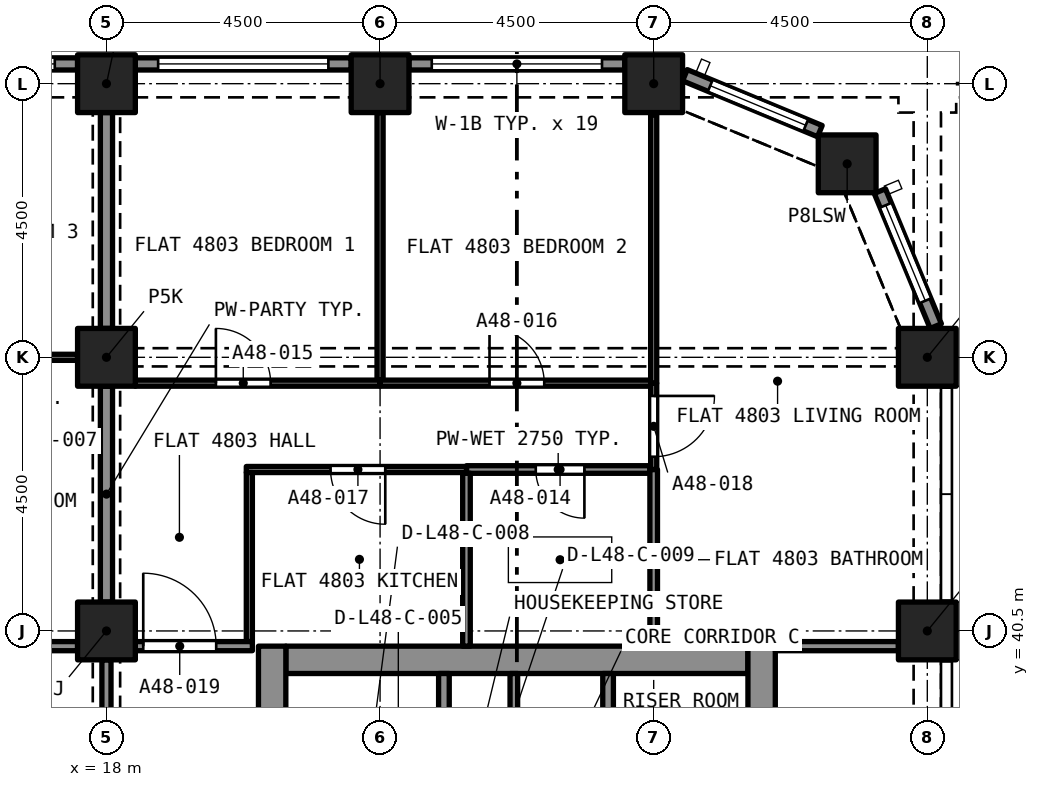
"""IFC4 building model, lengths in metres.
Left out: names, types, materials, properties, quantities, classifications, styles, units other than length and angle.
Written with IfcOpenShell. Run it as: python <this file> out.ifc"""

import sys

from ifc_helpers import new_model, si_unit, direction, frame, frame_2d, origin, origin_2d, place, context, subcontext, project, spatial, rectangle, extrude, element, fill, save


model = new_model("IFC4")
c1 = context("Model", 3, precision=1e-05, world=origin(), true_north=direction((0.0, 1.0)))
c2 = subcontext(c1, "Body", "Model", "MODEL_VIEW")
j1 = project(units=[si_unit("LENGTHUNIT", "METRE"), si_unit("PLANEANGLEUNIT", "RADIAN")], contexts=[c1])
p1 = place(None, origin())
s1 = spatial("IfcSite", under=j1, at=p1, CompositionType="ELEMENT")
p2 = place(p1, origin())
s2 = spatial("IfcBuilding", under=s1, at=p2, CompositionType="ELEMENT")
p3 = place(p2, frame((0.0, 0.0, 176.3)))
s3 = spatial("IfcBuildingStorey", under=s2, at=p3, CompositionType="ELEMENT", Elevation=176.3)
for number, where, z_axis, x_axis in (
    (1, (18.0, 40.5, 0.0), (0.0, 0.0, 1.0), (1.0, 0.0, 0.0)),
    (2, (31.5, 40.5, 0.0), (0.0, 0.0, 1.0), (1.0, 0.0, 0.0)),
    (3, (18.0, 45.0, 0.0), (0.0, 0.0, 1.0), (1.0, 0.0, 0.0)),
    (4, (31.5, 45.0, 0.0), (0.0, 0.0, 1.0), (1.0, 0.0, 0.0)),
    (5, (30.182, 48.182, 0.0), (0.0, 0.0, 1.0), (1.0, 0.0, 0.0)),
    (6, (18.0, 49.5, 0.0), (0.0, 0.0, 1.0), (1.0, 0.0, 0.0)),
):
    element("IfcColumn", number, at=place(p3, frame(where, z_axis=z_axis, x_axis=x_axis)), inside=s3, PredefinedType="COLUMN", context=c2, shape_type="SweptSolid", body=[
        extrude(rectangle(XDim=0.95, YDim=0.95, at=origin_2d()), origin(), (0.0, 0.0, 1.0), 3.2),
    ])
for number, where, z_axis, x_axis in (
    (7, (22.5, 49.5, -0.45), (0.0, 0.0, 1.0), (1.0, 0.0, 0.0)),
    (8, (27.0, 49.5, -0.45), (0.0, 0.0, 1.0), (1.0, 0.0, 0.0)),
):
    element("IfcColumn", number, at=place(p3, frame(where, z_axis=z_axis, x_axis=x_axis)), inside=s3, PredefinedType="COLUMN", context=c2, shape_type="SweptSolid", body=[
        extrude(rectangle(XDim=0.95, YDim=0.95, at=origin_2d()), origin(), (0.0, 0.0, 1.0), 3.65),
    ])
p4 = place(p3, frame((20.95, 40.025, 0.0), z_axis=(0.0, 0.0, 1.0), x_axis=(1.0, 0.0, 0.0)))
e9 = element("IfcWall", 9, at=p4, inside=s3, PredefinedType="SOLIDWALL", context=c2, shape_type="SweptSolid", body=[
    extrude(rectangle(XDim=7.6, YDim=0.45, at=frame_2d((3.8, 0.0))), origin(), (0.0, 0.0, 1.0), 3.2),
])
p5 = place(p3, frame((20.725, 27.25, 0.0), z_axis=(0.0, 0.0, 1.0), x_axis=(0.0, 1.0, 0.0)))
e10 = element("IfcWall", 10, at=p5, inside=s3, PredefinedType="SOLIDWALL", context=c2, shape_type="SweptSolid", body=[
    extrude(rectangle(XDim=13.0, YDim=0.45, at=frame_2d((6.5, 0.0))), origin(), (0.0, 0.0, 1.0), 3.2),
])
p6 = place(p5, frame((8.7, 0.0, 0.0)))
e11 = element("IfcOpeningElement", 11, at=p6, cuts=e10, PredefinedType="OPENING", context=c2, shape_type="SweptSolid", body=[
    extrude(rectangle(XDim=1.2, YDim=2.1, at=frame_2d((0.6, 1.05))), frame((0.0, 0.235, 0.0), z_axis=(0.0, -1.0, 0.0), x_axis=(1.0, 0.0, 0.0)), (0.0, 0.0, 1.0), 0.47),
])
p7 = place(p3, frame((28.775, 27.25, 0.0), z_axis=(0.0, 0.0, 1.0), x_axis=(0.0, 1.0, 0.0)))
e12 = element("IfcWall", 12, at=p7, inside=s3, PredefinedType="SOLIDWALL", context=c2, shape_type="SweptSolid", body=[
    extrude(rectangle(XDim=13.0, YDim=0.45, at=frame_2d((6.5, 0.0))), origin(), (0.0, 0.0, 1.0), 3.2),
])
p8 = place(p7, frame((8.7, 0.0, 0.0)))
e13 = element("IfcOpeningElement", 13, at=p8, cuts=e12, PredefinedType="OPENING", context=c2, shape_type="SweptSolid", body=[
    extrude(rectangle(XDim=1.2, YDim=2.1, at=frame_2d((0.6, 1.05))), frame((0.0, 0.235, 0.0), z_axis=(0.0, -1.0, 0.0), x_axis=(1.0, 0.0, 0.0)), (0.0, 0.0, 1.0), 0.47),
])
p9 = place(p3, frame((30.72, 47.733, 0.0), z_axis=(0.0, 0.0, 1.0), x_axis=(0.382680855588, -0.923880599843, 0.0)))
e14 = element("IfcWall", 14, at=p9, inside=s3, PredefinedType="SOLIDWALL", context=c2, shape_type="SweptSolid", body=[
    extrude(rectangle(XDim=2.403, YDim=0.2, at=frame_2d((1.201, 0.0))), origin(), (0.0, 0.0, 1.0), 3.2),
])
p10 = place(p9, frame((0.251, 0.0, 0.45)))
e15 = element("IfcOpeningElement", 15, at=p10, cuts=e14, PredefinedType="OPENING", context=c2, shape_type="SweptSolid", body=[
    extrude(rectangle(XDim=1.7, YDim=1.95, at=frame_2d((0.85, 0.975))), frame((0.0, 0.11, 0.0), z_axis=(0.0, -1.0, 0.0), x_axis=(1.0, 0.0, 0.0)), (0.0, 0.0, 1.0), 0.22),
])
p11 = place(p3, frame((27.513, 49.639, 0.0), z_axis=(0.0, 0.0, 1.0), x_axis=(0.923880599843, -0.382680855588, 0.0)))
e16 = element("IfcWall", 16, at=p11, inside=s3, PredefinedType="SOLIDWALL", context=c2, shape_type="SweptSolid", body=[
    extrude(rectangle(XDim=2.403, YDim=0.2, at=frame_2d((1.201, 0.0))), origin(), (0.0, 0.0, 1.0), 3.2),
])
p12 = place(p11, frame((0.451, 0.0, 0.45)))
e17 = element("IfcOpeningElement", 17, at=p12, cuts=e16, PredefinedType="OPENING", context=c2, shape_type="SweptSolid", body=[
    extrude(rectangle(XDim=1.7, YDim=1.95, at=frame_2d((0.85, 0.975))), frame((0.0, 0.11, 0.0), z_axis=(0.0, -1.0, 0.0), x_axis=(1.0, 0.0, 0.0)), (0.0, 0.0, 1.0), 0.22),
])
p13 = place(p3, frame((22.975, 49.825, 0.0), z_axis=(0.0, 0.0, 1.0), x_axis=(1.0, 0.0, 0.0)))
e18 = element("IfcWall", 18, at=p13, inside=s3, PredefinedType="SOLIDWALL", context=c2, shape_type="SweptSolid", body=[
    extrude(rectangle(XDim=3.55, YDim=0.2, at=frame_2d((1.775, 0.0))), origin(), (0.0, 0.0, 1.0), 3.2),
])
p14 = place(p13, frame((0.375, 0.0, 0.45)))
e19 = element("IfcOpeningElement", 19, at=p14, cuts=e18, PredefinedType="OPENING", context=c2, shape_type="SweptSolid", body=[
    extrude(rectangle(XDim=2.8, YDim=1.95, at=frame_2d((1.4, 0.975))), frame((0.0, 0.11, 0.0), z_axis=(0.0, -1.0, 0.0), x_axis=(1.0, 0.0, 0.0)), (0.0, 0.0, 1.0), 0.22),
])
p15 = place(p3, frame((18.475, 49.825, 0.0), z_axis=(0.0, 0.0, 1.0), x_axis=(1.0, 0.0, 0.0)))
e20 = element("IfcWall", 20, at=p15, inside=s3, PredefinedType="SOLIDWALL", context=c2, shape_type="SweptSolid", body=[
    extrude(rectangle(XDim=3.55, YDim=0.2, at=frame_2d((1.775, 0.0))), origin(), (0.0, 0.0, 1.0), 3.2),
])
p16 = place(p15, frame((0.375, 0.0, 0.45)))
e21 = element("IfcOpeningElement", 21, at=p16, cuts=e20, PredefinedType="OPENING", context=c2, shape_type="SweptSolid", body=[
    extrude(rectangle(XDim=2.8, YDim=1.95, at=frame_2d((1.4, 0.975))), frame((0.0, 0.11, 0.0), z_axis=(0.0, -1.0, 0.0), x_axis=(1.0, 0.0, 0.0)), (0.0, 0.0, 1.0), 0.22),
])
p17 = place(p3, frame((13.975, 49.825, 0.0), z_axis=(0.0, 0.0, 1.0), x_axis=(1.0, 0.0, 0.0)))
e22 = element("IfcWall", 22, at=p17, inside=s3, PredefinedType="SOLIDWALL", context=c2, shape_type="SweptSolid", body=[
    extrude(rectangle(XDim=3.55, YDim=0.2, at=frame_2d((1.775, 0.0))), origin(), (0.0, 0.0, 1.0), 3.2),
])
p18 = place(p17, frame((0.375, 0.0, 0.45)))
e23 = element("IfcOpeningElement", 23, at=p18, cuts=e22, PredefinedType="OPENING", context=c2, shape_type="SweptSolid", body=[
    extrude(rectangle(XDim=2.8, YDim=1.95, at=frame_2d((1.4, 0.975))), frame((0.0, 0.11, 0.0), z_axis=(0.0, -1.0, 0.0), x_axis=(1.0, 0.0, 0.0)), (0.0, 0.0, 1.0), 0.22),
])
p19 = place(p3, frame((17.9, 43.62, 0.0), z_axis=(0.0, 0.0, 1.0), x_axis=(-1.0, 0.0, 0.0)))
e24 = element("IfcWall", 24, at=p19, inside=s3, PredefinedType="PARTITIONING", context=c2, shape_type="SweptSolid", body=[
    extrude(rectangle(XDim=4.29, YDim=0.125, at=frame_2d((2.145, 0.0))), origin(), (0.0, 0.0, 1.0), 2.9),
])
p20 = place(p19, frame((1.695, 0.0, 0.0)))
e25 = element("IfcOpeningElement", 25, at=p20, cuts=e24, PredefinedType="OPENING", context=c2, shape_type="SweptSolid", body=[
    extrude(rectangle(XDim=0.8, YDim=2.1, at=frame_2d((0.4, 1.05))), frame((0.0, 0.073, 0.0), z_axis=(0.0, -1.0, 0.0), x_axis=(1.0, 0.0, 0.0)), (0.0, 0.0, 1.0), 0.145),
])
p21 = place(p3, frame((18.0, 40.975, 0.0), z_axis=(0.0, 0.0, 1.0), x_axis=(0.0, 1.0, 0.0)))
e26 = element("IfcWall", 26, at=p21, inside=s3, PredefinedType="PARTITIONING", context=c2, shape_type="SweptSolid", body=[
    extrude(rectangle(XDim=3.55, YDim=0.2, at=frame_2d((1.775, 0.0))), origin(), (0.0, 0.0, 1.0), 2.38),
])
p22 = place(p3, frame((13.5, 45.0, 0.0), z_axis=(0.0, 0.0, 1.0), x_axis=(1.0, 0.0, 0.0)))
e27 = element("IfcWall", 27, at=p22, inside=s3, PredefinedType="PARTITIONING", context=c2, shape_type="SweptSolid", body=[
    extrude(rectangle(XDim=4.025, YDim=0.1, at=frame_2d((2.012, 0.0))), origin(), (0.0, 0.0, 1.0), 2.9),
])
p23 = place(p22, frame((1.8, 0.0, 0.0)))
e28 = element("IfcOpeningElement", 28, at=p23, cuts=e27, PredefinedType="OPENING", context=c2, shape_type="SweptSolid", body=[
    extrude(rectangle(XDim=0.9, YDim=2.1, at=frame_2d((0.45, 1.05))), frame((0.0, 0.06, 0.0), z_axis=(0.0, -1.0, 0.0), x_axis=(1.0, 0.0, 0.0)), (0.0, 0.0, 1.0), 0.12),
])
p24 = place(p3, frame((18.0, 45.475, 0.0), z_axis=(0.0, 0.0, 1.0), x_axis=(0.0, 1.0, 0.0)))
e29 = element("IfcWall", 29, at=p24, inside=s3, PredefinedType="PARTITIONING", context=c2, shape_type="SweptSolid", body=[
    extrude(rectangle(XDim=3.55, YDim=0.2, at=frame_2d((1.775, 0.0))), origin(), (0.0, 0.0, 1.0), 2.38),
])
p25 = place(p3, frame((13.25, 40.25, 0.0), z_axis=(0.0, 0.0, 1.0), x_axis=(1.0, 0.0, 0.0)))
e30 = element("IfcWall", 30, at=p25, inside=s3, PredefinedType="PARTITIONING", context=c2, shape_type="SweptSolid", body=[
    extrude(rectangle(XDim=4.275, YDim=0.15, at=frame_2d((2.137, 0.0))), origin(), (0.0, 0.0, 1.0), 2.9),
])
p26 = place(p3, frame((26.938, 43.155, 0.0), z_axis=(0.0, 0.0, 1.0), x_axis=(-1.0, 0.0, 0.0)))
e31 = element("IfcWall", 31, at=p26, inside=s3, PredefinedType="PARTITIONING", context=c2, shape_type="SweptSolid", body=[
    extrude(rectangle(XDim=3.016, YDim=0.125, at=frame_2d((1.508, 0.0))), origin(), (0.0, 0.0, 1.0), 2.75),
])
p27 = place(p26, frame((1.077, 0.0, 0.0)))
e32 = element("IfcOpeningElement", 32, at=p27, cuts=e31, PredefinedType="OPENING", context=c2, shape_type="SweptSolid", body=[
    extrude(rectangle(XDim=0.8, YDim=2.1, at=frame_2d((0.4, 1.05))), frame((0.0, 0.073, 0.0), z_axis=(0.0, -1.0, 0.0), x_axis=(1.0, 0.0, 0.0)), (0.0, 0.0, 1.0), 0.145),
])
p28 = place(p3, frame((23.921, 40.25, 0.0), z_axis=(0.0, 0.0, 1.0), x_axis=(0.0, 1.0, 0.0)))
e33 = element("IfcWall", 33, at=p28, inside=s3, PredefinedType="PARTITIONING", context=c2, shape_type="SweptSolid", body=[
    extrude(rectangle(XDim=2.843, YDim=0.125, at=frame_2d((1.421, 0.0))), origin(), (0.0, 0.0, 1.0), 2.75),
])
p29 = place(p3, frame((27.0, 40.25, 0.0), z_axis=(0.0, 0.0, 1.0), x_axis=(0.0, 1.0, 0.0)))
e34 = element("IfcWall", 34, at=p29, inside=s3, PredefinedType="PARTITIONING", context=c2, shape_type="SweptSolid", body=[
    extrude(rectangle(XDim=2.905, YDim=0.125, at=frame_2d((1.453, 0.0))), origin(), (0.0, 0.0, 1.0), 2.75),
])
p30 = place(p3, frame((22.5, 44.625, 0.0), z_axis=(0.0, 0.0, 1.0), x_axis=(0.0, 1.0, 0.0)))
e35 = element("IfcWall", 35, at=p30, inside=s3, PredefinedType="PARTITIONING", context=c2, shape_type="SweptSolid", body=[
    extrude(rectangle(XDim=4.4, YDim=0.1, at=frame_2d((2.2, 0.0))), origin(), (0.0, 0.0, 1.0), 2.75),
])
p31 = place(p3, frame((18.475, 44.575, 0.0), z_axis=(0.0, 0.0, 1.0), x_axis=(1.0, 0.0, 0.0)))
e36 = element("IfcWall", 36, at=p31, inside=s3, PredefinedType="PARTITIONING", context=c2, shape_type="SweptSolid", body=[
    extrude(rectangle(XDim=4.025, YDim=0.1, at=frame_2d((2.012, 0.0))), origin(), (0.0, 0.0, 1.0), 2.75),
])
p32 = place(p31, frame((1.325, 0.0, 0.0)))
e37 = element("IfcOpeningElement", 37, at=p32, cuts=e36, PredefinedType="OPENING", context=c2, shape_type="SweptSolid", body=[
    extrude(rectangle(XDim=0.9, YDim=2.1, at=frame_2d((0.45, 1.05))), frame((0.0, 0.06, 0.0), z_axis=(0.0, -1.0, 0.0), x_axis=(1.0, 0.0, 0.0)), (0.0, 0.0, 1.0), 0.12),
])
p33 = place(p3, frame((22.5, 44.575, 0.0), z_axis=(0.0, 0.0, 1.0), x_axis=(1.0, 0.0, 0.0)))
e38 = element("IfcWall", 38, at=p33, inside=s3, PredefinedType="PARTITIONING", context=c2, shape_type="SweptSolid", body=[
    extrude(rectangle(XDim=4.45, YDim=0.1, at=frame_2d((2.225, 0.0))), origin(), (0.0, 0.0, 1.0), 2.75),
])
p34 = place(p33, frame((1.8, 0.0, 0.0)))
e39 = element("IfcOpeningElement", 39, at=p34, cuts=e38, PredefinedType="OPENING", context=c2, shape_type="SweptSolid", body=[
    extrude(rectangle(XDim=0.9, YDim=2.1, at=frame_2d((0.45, 1.05))), frame((0.0, 0.06, 0.0), z_axis=(0.0, -1.0, 0.0), x_axis=(1.0, 0.0, 0.0)), (0.0, 0.0, 1.0), 0.12),
])
p35 = place(p3, frame((27.0, 44.575, 0.0), z_axis=(0.0, 0.0, 1.0), x_axis=(0.0, 1.0, 0.0)))
e40 = element("IfcWall", 40, at=p35, inside=s3, PredefinedType="PARTITIONING", context=c2, shape_type="SweptSolid", body=[
    extrude(rectangle(XDim=4.411, YDim=0.1, at=frame_2d((2.206, 0.0))), origin(), (0.0, 0.0, 1.0), 2.75),
])
p36 = place(p3, frame((23.921, 43.155, 0.0), z_axis=(0.0, 0.0, 1.0), x_axis=(-1.0, 0.0, 0.0)))
e41 = element("IfcWall", 41, at=p36, inside=s3, PredefinedType="PARTITIONING", context=c2, shape_type="SweptSolid", body=[
    extrude(rectangle(XDim=3.621, YDim=0.1, at=frame_2d((1.811, 0.0))), origin(), (0.0, 0.0, 1.0), 2.75),
])
p37 = place(p36, frame((1.335, 0.0, 0.0)))
e42 = element("IfcOpeningElement", 42, at=p37, cuts=e41, PredefinedType="OPENING", context=c2, shape_type="SweptSolid", body=[
    extrude(rectangle(XDim=0.9, YDim=2.1, at=frame_2d((0.45, 1.05))), frame((0.0, 0.06, 0.0), z_axis=(0.0, -1.0, 0.0), x_axis=(1.0, 0.0, 0.0)), (0.0, 0.0, 1.0), 0.12),
])
p38 = place(p3, frame((20.35, 40.325, 0.0), z_axis=(0.0, 0.0, 1.0), x_axis=(0.0, 1.0, 0.0)))
e43 = element("IfcWall", 43, at=p38, inside=s3, PredefinedType="PARTITIONING", context=c2, shape_type="SweptSolid", body=[
    extrude(rectangle(XDim=2.78, YDim=0.1, at=frame_2d((1.39, 0.0))), origin(), (0.0, 0.0, 1.0), 2.75),
])
p39 = place(p3, frame((27.0, 44.575, 0.0), z_axis=(0.0, 0.0, 1.0), x_axis=(0.0, -1.0, 0.0)))
e44 = element("IfcWall", 44, at=p39, inside=s3, PredefinedType="PARTITIONING", context=c2, shape_type="SweptSolid", body=[
    extrude(rectangle(XDim=1.42, YDim=0.1, at=frame_2d((0.71, 0.0))), origin(), (0.0, 0.0, 1.0), 2.75),
])
p40 = place(p39, frame((0.21, 0.0, 0.0)))
e45 = element("IfcOpeningElement", 45, at=p40, cuts=e44, PredefinedType="OPENING", context=c2, shape_type="SweptSolid", body=[
    extrude(rectangle(XDim=1.0, YDim=2.1, at=frame_2d((0.5, 1.05))), frame((0.0, 0.06, 0.0), z_axis=(0.0, -1.0, 0.0), x_axis=(1.0, 0.0, 0.0)), (0.0, 0.0, 1.0), 0.12),
])
p41 = place(p3, frame((18.475, 40.25, 0.0), z_axis=(0.0, 0.0, 1.0), x_axis=(1.0, 0.0, 0.0)))
e46 = element("IfcWall", 46, at=p41, inside=s3, PredefinedType="PARTITIONING", context=c2, shape_type="SweptSolid", body=[
    extrude(rectangle(XDim=1.925, YDim=0.15, at=frame_2d((0.962, 0.0))), origin(), (0.0, 0.0, 1.0), 2.75),
])
p42 = place(p41, frame((0.13, 0.0, 0.0)))
e47 = element("IfcOpeningElement", 47, at=p42, cuts=e46, PredefinedType="OPENING", context=c2, shape_type="SweptSolid", body=[
    extrude(rectangle(XDim=1.2, YDim=2.4, at=frame_2d((0.6, 1.2))), frame((0.0, 0.085, 0.0), z_axis=(0.0, -1.0, 0.0), x_axis=(1.0, 0.0, 0.0)), (0.0, 0.0, 1.0), 0.17),
])
p43 = place(p3, frame((29.0, 40.25, 0.0), z_axis=(0.0, 0.0, 1.0), x_axis=(1.0, 0.0, 0.0)))
e48 = element("IfcWall", 48, at=p43, inside=s3, PredefinedType="PARTITIONING", context=c2, shape_type="SweptSolid", body=[
    extrude(rectangle(XDim=2.025, YDim=0.15, at=frame_2d((1.012, 0.0))), origin(), (0.0, 0.0, 1.0), 2.75),
])
p44 = place(p3, frame((18.0, 40.025, 0.0), z_axis=(0.0, 0.0, 1.0), x_axis=(0.0, -1.0, 0.0)))
e49 = element("IfcWall", 49, at=p44, inside=s3, PredefinedType="PARTITIONING", context=c2, shape_type="SweptSolid", body=[
    extrude(rectangle(XDim=3.55, YDim=0.15, at=frame_2d((1.775, 0.0))), origin(), (0.0, 0.0, 1.0), 2.38),
])
p45 = place(p44, frame((1.175, 0.0, 0.0)))
e50 = element("IfcOpeningElement", 50, at=p45, cuts=e49, PredefinedType="OPENING", context=c2, shape_type="SweptSolid", body=[
    extrude(rectangle(XDim=1.2, YDim=2.1, at=frame_2d((0.6, 1.05))), frame((0.0, 0.085, 0.0), z_axis=(0.0, -1.0, 0.0), x_axis=(1.0, 0.0, 0.0)), (0.0, 0.0, 1.0), 0.17),
])
for number, where, z_axis, x_axis in (
    (51, (23.55, 37.5, 0.0), (0.0, 0.0, 1.0), (0.0, 1.0, 0.0)),
    (52, (26.25, 37.5, 0.0), (0.0, 0.0, 1.0), (0.0, 1.0, 0.0)),
):
    element("IfcWall", number, at=place(p3, frame(where, z_axis=z_axis, x_axis=x_axis)), inside=s3, PredefinedType="SOLIDWALL", context=c2, shape_type="SweptSolid", body=[
        extrude(rectangle(XDim=2.3, YDim=0.175, at=frame_2d((1.15, 0.0))), origin(), (0.0, 0.0, 1.0), 2.9),
    ])
p46 = place(p3, frame((24.7, 37.5, 0.0), z_axis=(0.0, 0.0, 1.0), x_axis=(0.0, 1.0, 0.0)))
e53 = element("IfcWall", 53, at=p46, inside=s3, PredefinedType="PARTITIONING", context=c2, shape_type="SweptSolid", body=[
    extrude(rectangle(XDim=2.3, YDim=0.125, at=frame_2d((1.15, 0.0))), origin(), (0.0, 0.0, 1.0), 2.9),
])
p47 = place(p10, origin())
e54 = element("IfcWindow", 54, at=p47, inside=s3, PartitioningType="SINGLE_PANEL", PredefinedType="WINDOW", context=c2, shape_type="SweptSolid", body=[
    extrude(rectangle(XDim=1.7, YDim=1.95, at=frame_2d((0.85, 0.975))), frame((0.0, 0.03, 0.0), z_axis=(0.0, -1.0, 0.0), x_axis=(1.0, 0.0, 0.0)), (0.0, 0.0, 1.0), 0.06),
])
fill(e15, e54)
p48 = place(p12, origin())
e55 = element("IfcWindow", 55, at=p48, inside=s3, PartitioningType="SINGLE_PANEL", PredefinedType="WINDOW", context=c2, shape_type="SweptSolid", body=[
    extrude(rectangle(XDim=1.7, YDim=1.95, at=frame_2d((0.85, 0.975))), frame((0.0, 0.03, 0.0), z_axis=(0.0, -1.0, 0.0), x_axis=(1.0, 0.0, 0.0)), (0.0, 0.0, 1.0), 0.06),
])
fill(e17, e55)
p49 = place(p14, origin())
e56 = element("IfcWindow", 56, at=p49, inside=s3, PartitioningType="SINGLE_PANEL", PredefinedType="WINDOW", context=c2, shape_type="SweptSolid", body=[
    extrude(rectangle(XDim=2.8, YDim=1.95, at=frame_2d((1.4, 0.975))), frame((0.0, 0.03, 0.0), z_axis=(0.0, -1.0, 0.0), x_axis=(1.0, 0.0, 0.0)), (0.0, 0.0, 1.0), 0.06),
])
fill(e19, e56)
p50 = place(p16, origin())
e57 = element("IfcWindow", 57, at=p50, inside=s3, PartitioningType="SINGLE_PANEL", PredefinedType="WINDOW", context=c2, shape_type="SweptSolid", body=[
    extrude(rectangle(XDim=2.8, YDim=1.95, at=frame_2d((1.4, 0.975))), frame((0.0, 0.03, 0.0), z_axis=(0.0, -1.0, 0.0), x_axis=(1.0, 0.0, 0.0)), (0.0, 0.0, 1.0), 0.06),
])
fill(e21, e57)
p51 = place(p18, origin())
e58 = element("IfcWindow", 58, at=p51, inside=s3, PartitioningType="SINGLE_PANEL", PredefinedType="WINDOW", context=c2, shape_type="SweptSolid", body=[
    extrude(rectangle(XDim=2.8, YDim=1.95, at=frame_2d((1.4, 0.975))), frame((0.0, 0.03, 0.0), z_axis=(0.0, -1.0, 0.0), x_axis=(1.0, 0.0, 0.0)), (0.0, 0.0, 1.0), 0.06),
])
fill(e23, e58)
p52 = place(p27, origin())
e59 = element("IfcDoor", 59, at=p52, inside=s3, OperationType="SINGLE_SWING_LEFT", PredefinedType="DOOR", context=c2, shape_type="SweptSolid", body=[
    extrude(rectangle(XDim=0.8, YDim=2.1, at=frame_2d((0.4, 1.05))), frame((0.0, 0.025, 0.0), z_axis=(0.0, -1.0, 0.0), x_axis=(1.0, 0.0, 0.0)), (0.0, 0.0, 1.0), 0.05),
])
fill(e32, e59)
p53 = place(p32, origin())
e60 = element("IfcDoor", 60, at=p53, inside=s3, OperationType="SINGLE_SWING_LEFT", PredefinedType="DOOR", context=c2, shape_type="SweptSolid", body=[
    extrude(rectangle(XDim=0.9, YDim=2.1, at=frame_2d((0.45, 1.05))), frame((0.0, 0.025, 0.0), z_axis=(0.0, -1.0, 0.0), x_axis=(1.0, 0.0, 0.0)), (0.0, 0.0, 1.0), 0.05),
])
fill(e37, e60)
p54 = place(p34, origin())
e61 = element("IfcDoor", 61, at=p54, inside=s3, OperationType="SINGLE_SWING_RIGHT", PredefinedType="DOOR", context=c2, shape_type="SweptSolid", body=[
    extrude(rectangle(XDim=0.9, YDim=2.1, at=frame_2d((0.45, 1.05))), frame((0.0, 0.025, 0.0), z_axis=(0.0, -1.0, 0.0), x_axis=(1.0, 0.0, 0.0)), (0.0, 0.0, 1.0), 0.05),
])
fill(e39, e61)
p55 = place(p37, origin())
e62 = element("IfcDoor", 62, at=p55, inside=s3, OperationType="SINGLE_SWING_LEFT", PredefinedType="DOOR", context=c2, shape_type="SweptSolid", body=[
    extrude(rectangle(XDim=0.9, YDim=2.1, at=frame_2d((0.45, 1.05))), frame((0.0, 0.025, 0.0), z_axis=(0.0, -1.0, 0.0), x_axis=(1.0, 0.0, 0.0)), (0.0, 0.0, 1.0), 0.05),
])
fill(e42, e62)
p56 = place(p40, origin())
e63 = element("IfcDoor", 63, at=p56, inside=s3, OperationType="SINGLE_SWING_RIGHT", PredefinedType="DOOR", context=c2, shape_type="SweptSolid", body=[
    extrude(rectangle(XDim=1.0, YDim=2.1, at=frame_2d((0.5, 1.05))), frame((0.0, 0.025, 0.0), z_axis=(0.0, -1.0, 0.0), x_axis=(1.0, 0.0, 0.0)), (0.0, 0.0, 1.0), 0.05),
])
fill(e45, e63)
p57 = place(p42, origin())
e64 = element("IfcDoor", 64, at=p57, inside=s3, OperationType="SINGLE_SWING_LEFT", PredefinedType="DOOR", context=c2, shape_type="SweptSolid", body=[
    extrude(rectangle(XDim=1.2, YDim=2.4, at=frame_2d((0.6, 1.2))), frame((0.0, 0.025, 0.0), z_axis=(0.0, -1.0, 0.0), x_axis=(1.0, 0.0, 0.0)), (0.0, 0.0, 1.0), 0.05),
])
fill(e47, e64)
save(model, sys.argv[1])
